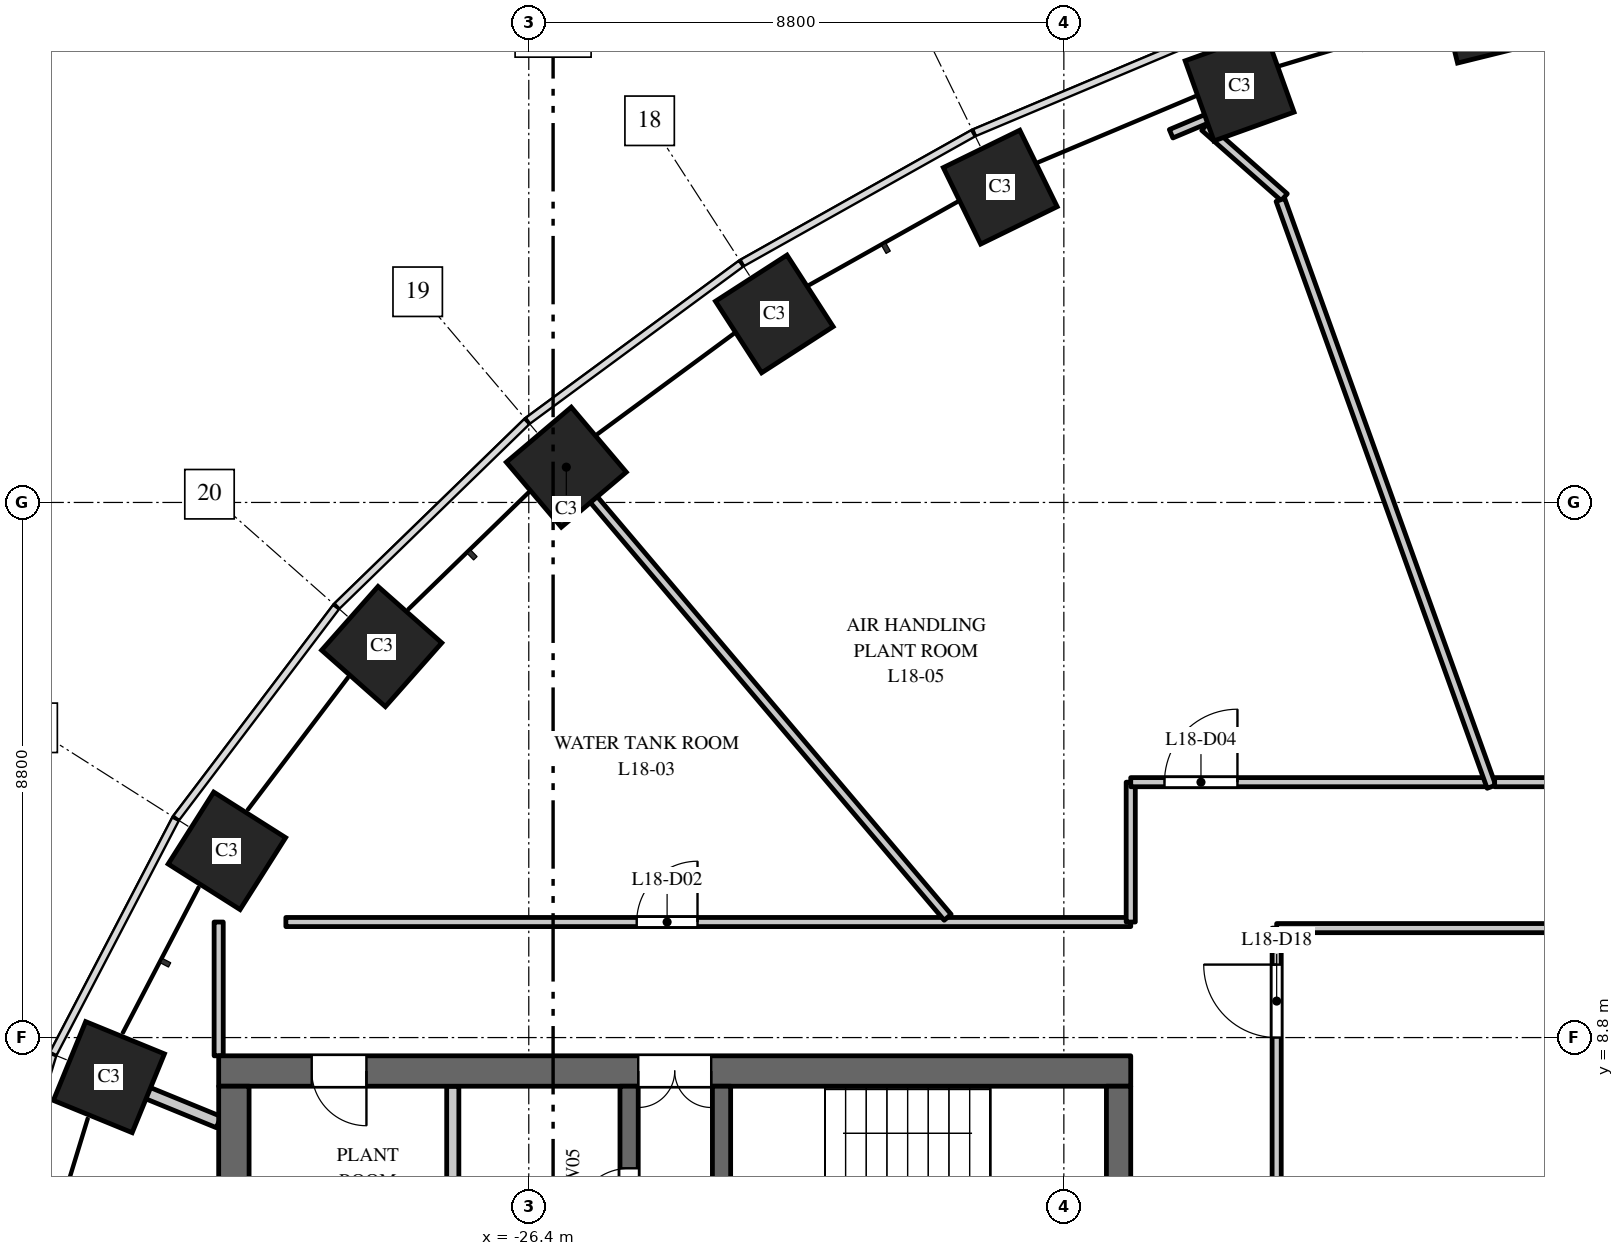
"""IFC4 building model, lengths in metres.
Left out: names, types, materials, properties, quantities, classifications, styles, units other than length and angle.
Written with IfcOpenShell. Run it as: python <this file> out.ifc"""

import sys

from ifc_helpers import new_model, si_unit, direction, frame, frame_2d, origin, origin_2d, place, context, subcontext, project, spatial, rectangle, extrude, element, fill, save


model = new_model("IFC4")
c1 = context("Model", 3, precision=1e-05, world=origin(), true_north=direction((0.0, 1.0)))
c2 = subcontext(c1, "Body", "Model", "MODEL_VIEW")
j1 = project(units=[si_unit("LENGTHUNIT", "METRE"), si_unit("PLANEANGLEUNIT", "RADIAN")], contexts=[c1])
p1 = place(None, origin())
s1 = spatial("IfcSite", under=j1, at=p1, CompositionType="ELEMENT")
p2 = place(p1, origin())
s2 = spatial("IfcBuilding", under=s1, at=p2, CompositionType="ELEMENT")
p3 = place(p2, frame((0.0, 0.0, 82.5)))
s3 = spatial("IfcBuildingStorey", under=s2, at=p3, CompositionType="ELEMENT", Elevation=82.5)
for number, where, z_axis, x_axis in (
    (1, (-10.613, 25.674, 0.0), (0.0, 0.0, 1.0), (-0.971, -0.24, 0.0)),
    (2, (-14.709, 24.441, 0.0), (0.0, 0.0, 1.0), (-0.941, -0.338, 0.0)),
    (3, (-18.646, 22.785, 0.0), (0.0, 0.0, 1.0), (-0.898, -0.439, 0.0)),
    (4, (-22.362, 20.7, 0.0), (0.0, 0.0, 1.0), (-0.84, -0.542, 0.0)),
    (5, (-25.783, 18.18, 0.0), (0.0, 0.0, 1.0), (-0.763, -0.646, 0.0)),
    (6, (-28.819, 15.23, 0.0), (0.0, 0.0, 1.0), (-0.663, -0.749, 0.0)),
    (7, (-31.365, 11.871, 0.0), (0.0, 0.0, 1.0), (-0.535, -0.845, 0.0)),
    (8, (-33.305, 8.149, 0.0), (0.0, 0.0, 1.0), (-0.379, -0.925, 0.0)),
):
    element("IfcColumn", number, at=place(p3, frame(where, z_axis=z_axis, x_axis=x_axis)), inside=s3, PredefinedType="COLUMN", context=c2, shape_type="SweptSolid", body=[
        extrude(rectangle(XDim=1.4, YDim=1.4, at=origin_2d()), origin(), (0.0, 0.0, 1.0), 5.5),
    ])
p4 = place(p3, frame((-16.5, 8.25, 0.0), z_axis=(0.0, 0.0, 1.0), x_axis=(-1.0, 0.0, 0.0)))
e9 = element("IfcWall", 9, at=p4, inside=s3, PredefinedType="SHEAR", context=c2, shape_type="SweptSolid", body=[
    extrude(rectangle(XDim=15.0, YDim=0.5, at=frame_2d((7.5, 0.0))), origin(), (0.0, 0.0, 1.0), 5.2),
])
p5 = place(p4, frame((6.9, 0.0, 0.0)))
e10 = element("IfcOpeningElement", 10, at=p5, cuts=e9, PredefinedType="OPENING", context=c2, shape_type="SweptSolid", body=[
    extrude(rectangle(XDim=1.2, YDim=2.1, at=frame_2d((0.6, 1.05))), frame((0.0, 0.26, 0.0), z_axis=(0.0, -1.0, 0.0), x_axis=(1.0, 0.0, 0.0)), (0.0, 0.0, 1.0), 0.52),
])
p6 = place(p4, frame((12.57, 0.0, 0.0)))
e11 = element("IfcOpeningElement", 11, at=p6, cuts=e9, PredefinedType="OPENING", context=c2, shape_type="SweptSolid", body=[
    extrude(rectangle(XDim=0.9, YDim=2.1, at=frame_2d((0.45, 1.05))), frame((0.0, 0.26, 0.0), z_axis=(0.0, -1.0, 0.0), x_axis=(1.0, 0.0, 0.0)), (0.0, 0.0, 1.0), 0.52),
])
p7 = place(p3, frame((-24.75, -8.0, 0.0), z_axis=(0.0, 0.0, 1.0), x_axis=(0.0, 1.0, 0.0)))
e12 = element("IfcWall", 12, at=p7, inside=s3, PredefinedType="SHEAR", context=c2, shape_type="SweptSolid", body=[
    extrude(rectangle(XDim=16.0, YDim=0.3, at=frame_2d((8.0, 0.0))), origin(), (0.0, 0.0, 1.0), 5.2),
])
p8 = place(p7, frame((4.425, 0.0, 0.0)))
e13 = element("IfcOpeningElement", 13, at=p8, cuts=e12, PredefinedType="OPENING", context=c2, shape_type="SweptSolid", body=[
    extrude(rectangle(XDim=1.1, YDim=2.1, at=frame_2d((0.55, 1.05))), frame((0.0, 0.16, 0.0), z_axis=(0.0, -1.0, 0.0), x_axis=(1.0, 0.0, 0.0)), (0.0, 0.0, 1.0), 0.32),
])
p9 = place(p7, frame((7.45, 0.0, 0.0)))
e14 = element("IfcOpeningElement", 14, at=p9, cuts=e12, PredefinedType="OPENING", context=c2, shape_type="SweptSolid", body=[
    extrude(rectangle(XDim=1.1, YDim=2.1, at=frame_2d((0.55, 1.05))), frame((0.0, 0.16, 0.0), z_axis=(0.0, -1.0, 0.0), x_axis=(1.0, 0.0, 0.0)), (0.0, 0.0, 1.0), 0.32),
])
p10 = place(p7, frame((10.425, 0.0, 0.0)))
e15 = element("IfcOpeningElement", 15, at=p10, cuts=e12, PredefinedType="OPENING", context=c2, shape_type="SweptSolid", body=[
    extrude(rectangle(XDim=1.2, YDim=2.1, at=frame_2d((0.6, 1.05))), frame((0.0, 0.16, 0.0), z_axis=(0.0, -1.0, 0.0), x_axis=(1.0, 0.0, 0.0)), (0.0, 0.0, 1.0), 0.32),
])
p11 = place(p7, frame((13.75, 0.0, 0.0)))
e16 = element("IfcOpeningElement", 16, at=p11, cuts=e12, PredefinedType="OPENING", context=c2, shape_type="SweptSolid", body=[
    extrude(rectangle(XDim=0.9, YDim=2.1, at=frame_2d((0.45, 1.05))), frame((0.0, 0.16, 0.0), z_axis=(0.0, -1.0, 0.0), x_axis=(1.0, 0.0, 0.0)), (0.0, 0.0, 1.0), 0.32),
])
p12 = place(p7, frame((1.975, 0.0, 0.0)))
e17 = element("IfcOpeningElement", 17, at=p12, cuts=e12, PredefinedType="OPENING", context=c2, shape_type="SweptSolid", body=[
    extrude(rectangle(XDim=0.9, YDim=2.1, at=frame_2d((0.45, 1.05))), frame((0.0, 0.16, 0.0), z_axis=(0.0, -1.0, 0.0), x_axis=(1.0, 0.0, 0.0)), (0.0, 0.0, 1.0), 0.32),
])
p13 = place(p7, frame((0.35, 0.0, 0.0)))
e18 = element("IfcOpeningElement", 18, at=p13, cuts=e12, PredefinedType="OPENING", context=c2, shape_type="SweptSolid", body=[
    extrude(rectangle(XDim=0.9, YDim=2.1, at=frame_2d((0.45, 1.05))), frame((0.0, 0.16, 0.0), z_axis=(0.0, -1.0, 0.0), x_axis=(1.0, 0.0, 0.0)), (0.0, 0.0, 1.0), 0.32),
])
p14 = place(p3, frame((-16.7, -8.0, 0.0), z_axis=(0.0, 0.0, 1.0), x_axis=(0.0, 1.0, 0.0)))
e19 = element("IfcWall", 19, at=p14, inside=s3, PredefinedType="SHEAR", context=c2, shape_type="SweptSolid", body=[
    extrude(rectangle(XDim=16.0, YDim=0.4, at=frame_2d((8.0, 0.0))), origin(), (0.0, 0.0, 1.0), 5.2),
])
p15 = place(p3, frame((-31.25, -8.0, 0.0), z_axis=(0.0, 0.0, 1.0), x_axis=(0.0, 1.0, 0.0)))
e20 = element("IfcWall", 20, at=p15, inside=s3, PredefinedType="SHEAR", context=c2, shape_type="SweptSolid", body=[
    extrude(rectangle(XDim=16.0, YDim=0.5, at=frame_2d((8.0, 0.0))), origin(), (0.0, 0.0, 1.0), 5.2),
])
p16 = place(p3, frame((-27.65, 4.75, 0.0), z_axis=(0.0, 0.0, 1.0), x_axis=(0.0, 1.0, 0.0)))
e21 = element("IfcWall", 21, at=p16, inside=s3, PredefinedType="PARTITIONING", context=c2, shape_type="SweptSolid", body=[
    extrude(rectangle(XDim=3.25, YDim=0.2, at=frame_2d((1.625, 0.0))), origin(), (0.0, 0.0, 1.0), 5.2),
])
p17 = place(p3, frame((-23.23, 2.25, 0.0), z_axis=(0.0, 0.0, 1.0), x_axis=(0.0, 1.0, 0.0)))
e22 = element("IfcWall", 22, at=p17, inside=s3, PredefinedType="SHEAR", context=c2, shape_type="SweptSolid", body=[
    extrude(rectangle(XDim=5.75, YDim=0.3, at=frame_2d((2.875, 0.0))), origin(), (0.0, 0.0, 1.0), 5.2),
])
p18 = place(p17, frame((0.6, 0.0, 0.0)))
e23 = element("IfcOpeningElement", 23, at=p18, cuts=e22, PredefinedType="OPENING", context=c2, shape_type="SweptSolid", body=[
    extrude(rectangle(XDim=1.0, YDim=2.1, at=frame_2d((0.5, 1.05))), frame((0.0, 0.16, 0.0), z_axis=(0.0, -1.0, 0.0), x_axis=(1.0, 0.0, 0.0)), (0.0, 0.0, 1.0), 0.32),
])
p19 = place(p3, frame((-33.398, 8.187, 0.0), z_axis=(0.0, 0.0, 1.0), x_axis=(0.925433139688, -0.378910944639, 0.0)))
e24 = element("IfcWall", 24, at=p19, inside=s3, PredefinedType="PARTITIONING", context=c2, shape_type="SweptSolid", body=[
    extrude(rectangle(XDim=2.051, YDim=0.2, at=frame_2d((1.025, 0.0))), origin(), (0.0, 0.0, 1.0), 5.2),
])
p20 = place(p3, frame((-31.5, 8.5, 0.0), z_axis=(0.0, 0.0, 1.0), x_axis=(0.0, 1.0, 0.0)))
e25 = element("IfcWall", 25, at=p20, inside=s3, PredefinedType="PARTITIONING", context=c2, shape_type="SweptSolid", body=[
    extrude(rectangle(XDim=2.2, YDim=0.15, at=frame_2d((1.1, 0.0))), origin(), (0.0, 0.0, 1.0), 5.2),
])
p21 = place(p3, frame((-30.395, 10.7, 0.0), z_axis=(0.0, 0.0, 1.0), x_axis=(1.0, 0.0, 0.0)))
e26 = element("IfcWall", 26, at=p21, inside=s3, PredefinedType="PARTITIONING", context=c2, shape_type="SweptSolid", body=[
    extrude(rectangle(XDim=13.895, YDim=0.15, at=frame_2d((6.948, 0.0))), origin(), (0.0, 0.0, 1.0), 4.4),
])
p22 = place(p21, frame((5.77, 0.0, 0.0)))
e27 = element("IfcOpeningElement", 27, at=p22, cuts=e26, PredefinedType="OPENING", context=c2, shape_type="SweptSolid", body=[
    extrude(rectangle(XDim=1.0, YDim=2.1, at=frame_2d((0.5, 1.05))), frame((0.0, 0.085, 0.0), z_axis=(0.0, -1.0, 0.0), x_axis=(1.0, 0.0, 0.0)), (0.0, 0.0, 1.0), 0.17),
])
p23 = place(p3, frame((-25.847, 18.257, 0.0), z_axis=(0.0, 0.0, 1.0), x_axis=(0.646390974263, -0.76300636196, 0.0)))
e28 = element("IfcWall", 28, at=p23, inside=s3, PredefinedType="PARTITIONING", context=c2, shape_type="SweptSolid", body=[
    extrude(rectangle(XDim=9.802, YDim=0.15, at=frame_2d((4.901, 0.0))), origin(), (0.0, 0.0, 1.0), 5.2),
])
p24 = place(p3, frame((-16.5, 10.7, 0.0), z_axis=(0.0, 0.0, 1.0), x_axis=(0.0, 1.0, 0.0)))
e29 = element("IfcWall", 29, at=p24, inside=s3, PredefinedType="PARTITIONING", context=c2, shape_type="SweptSolid", body=[
    extrude(rectangle(XDim=2.3, YDim=0.15, at=frame_2d((1.15, 0.0))), origin(), (0.0, 0.0, 1.0), 4.25),
])
p25 = place(p3, frame((-16.5, 13.0, 0.0), z_axis=(0.0, 0.0, 1.0), x_axis=(1.0, 0.0, 0.0)))
e30 = element("IfcWall", 30, at=p25, inside=s3, PredefinedType="PARTITIONING", context=c2, shape_type="SweptSolid", body=[
    extrude(rectangle(XDim=5.893, YDim=0.15, at=frame_2d((2.947, 0.0))), origin(), (0.0, 0.0, 1.0), 4.35),
])
p26 = place(p25, frame((0.555, 0.0, 0.0)))
e31 = element("IfcOpeningElement", 31, at=p26, cuts=e30, PredefinedType="OPENING", context=c2, shape_type="SweptSolid", body=[
    extrude(rectangle(XDim=1.2, YDim=2.1, at=frame_2d((0.6, 1.05))), frame((0.0, 0.085, 0.0), z_axis=(0.0, -1.0, 0.0), x_axis=(1.0, 0.0, 0.0)), (0.0, 0.0, 1.0), 0.17),
])
p27 = place(p3, frame((-15.283, 23.776, 0.0), z_axis=(0.0, 0.0, 1.0), x_axis=(0.749266135691, -0.662269022307, 0.0)))
e32 = element("IfcWall", 32, at=p27, inside=s3, PredefinedType="PARTITIONING", context=c2, shape_type="SweptSolid", body=[
    extrude(rectangle(XDim=1.746, YDim=0.15, at=frame_2d((0.873, 0.0))), origin(), (0.0, 0.0, 1.0), 4.4),
])
p28 = place(p3, frame((-14.1, -10.6, 0.0), z_axis=(0.0, 0.0, 1.0), x_axis=(0.0, 1.0, 0.0)))
e33 = element("IfcWall", 33, at=p28, inside=s3, PredefinedType="PARTITIONING", context=c2, shape_type="SweptSolid", body=[
    extrude(rectangle(XDim=21.2, YDim=0.15, at=frame_2d((10.6, 0.0))), origin(), (0.0, 0.0, 1.0), 4.25),
])
p29 = place(p28, frame((19.4, 0.0, 0.0)))
e34 = element("IfcOpeningElement", 34, at=p29, cuts=e33, PredefinedType="OPENING", context=c2, shape_type="SweptSolid", body=[
    extrude(rectangle(XDim=1.2, YDim=2.1, at=frame_2d((0.6, 1.05))), frame((0.0, 0.085, 0.0), z_axis=(0.0, -1.0, 0.0), x_axis=(1.0, 0.0, 0.0)), (0.0, 0.0, 1.0), 0.17),
])
p30 = place(p3, frame((-14.1, 10.6, 0.0), z_axis=(0.0, 0.0, 1.0), x_axis=(1.0, 0.0, 0.0)))
e35 = element("IfcWall", 35, at=p30, inside=s3, PredefinedType="PARTITIONING", context=c2, shape_type="SweptSolid", body=[
    extrude(rectangle(XDim=28.2, YDim=0.15, at=frame_2d((14.1, 0.0))), origin(), (0.0, 0.0, 1.0), 4.35),
])
p31 = place(p30, frame((8.32, 0.0, 0.0)))
e36 = element("IfcOpeningElement", 36, at=p31, cuts=e35, PredefinedType="OPENING", context=c2, shape_type="SweptSolid", body=[
    extrude(rectangle(XDim=1.0, YDim=2.1, at=frame_2d((0.5, 1.05))), frame((0.0, 0.085, 0.0), z_axis=(0.0, -1.0, 0.0), x_axis=(1.0, 0.0, 0.0)), (0.0, 0.0, 1.0), 0.17),
])
p32 = place(p30, frame((13.02, 0.0, 0.0)))
e37 = element("IfcOpeningElement", 37, at=p32, cuts=e35, PredefinedType="OPENING", context=c2, shape_type="SweptSolid", body=[
    extrude(rectangle(XDim=1.0, YDim=2.1, at=frame_2d((0.5, 1.05))), frame((0.0, 0.085, 0.0), z_axis=(0.0, -1.0, 0.0), x_axis=(1.0, 0.0, 0.0)), (0.0, 0.0, 1.0), 0.17),
])
p33 = place(p30, frame((17.72, 0.0, 0.0)))
e38 = element("IfcOpeningElement", 38, at=p33, cuts=e35, PredefinedType="OPENING", context=c2, shape_type="SweptSolid", body=[
    extrude(rectangle(XDim=1.0, YDim=2.1, at=frame_2d((0.5, 1.05))), frame((0.0, 0.085, 0.0), z_axis=(0.0, -1.0, 0.0), x_axis=(1.0, 0.0, 0.0)), (0.0, 0.0, 1.0), 0.17),
])
p34 = place(p30, frame((19.92, 0.0, 0.0)))
e39 = element("IfcOpeningElement", 39, at=p34, cuts=e35, PredefinedType="OPENING", context=c2, shape_type="SweptSolid", body=[
    extrude(rectangle(XDim=1.2, YDim=2.1, at=frame_2d((0.6, 1.05))), frame((0.0, 0.085, 0.0), z_axis=(0.0, -1.0, 0.0), x_axis=(1.0, 0.0, 0.0)), (0.0, 0.0, 1.0), 0.17),
])
p35 = place(p3, frame((-14.039, 22.576, 0.0), z_axis=(0.0, 0.0, 1.0), x_axis=(0.338428639274, -0.940992059541, 0.0)))
e40 = element("IfcWall", 40, at=p35, inside=s3, PredefinedType="PARTITIONING", context=c2, shape_type="SweptSolid", body=[
    extrude(rectangle(XDim=10.256, YDim=0.15, at=frame_2d((5.128, 0.0))), origin(), (0.0, 0.0, 1.0), 4.35),
])
p36 = place(p3, frame((-10.515, 13.0, 0.0), z_axis=(0.0, 0.0, 1.0), x_axis=(1.0, 0.0, 0.0)))
e41 = element("IfcWall", 41, at=p36, inside=s3, PredefinedType="PARTITIONING", context=c2, shape_type="SweptSolid", body=[
    extrude(rectangle(XDim=9.448, YDim=0.15, at=frame_2d((4.724, 0.0))), origin(), (0.0, 0.0, 1.0), 4.35),
])
p37 = place(p36, frame((7.515, 0.0, 0.0)))
e42 = element("IfcOpeningElement", 42, at=p37, cuts=e41, PredefinedType="OPENING", context=c2, shape_type="SweptSolid", body=[
    extrude(rectangle(XDim=1.2, YDim=2.1, at=frame_2d((0.6, 1.05))), frame((0.0, 0.085, 0.0), z_axis=(0.0, -1.0, 0.0), x_axis=(1.0, 0.0, 0.0)), (0.0, 0.0, 1.0), 0.17),
])
p38 = place(p3, frame((-15.229, 23.919, 0.0), z_axis=(0.0, 0.0, 1.0), x_axis=(-0.921921214846, -0.387377430444, 0.0)))
e43 = element("IfcWall", 43, at=p38, inside=s3, PredefinedType="PARTITIONING", context=c2, shape_type="SweptSolid", body=[
    extrude(rectangle(XDim=0.659, YDim=0.15, at=frame_2d((0.329, 0.0))), origin(), (0.0, 0.0, 1.0), 5.2),
])
p39 = place(p5, origin())
e44 = element("IfcDoor", 44, at=p39, inside=s3, OperationType="DOUBLE_DOOR_DOUBLE_SWING", PredefinedType="DOOR", context=c2, shape_type="SweptSolid", body=[
    extrude(rectangle(XDim=1.2, YDim=2.1, at=frame_2d((0.6, 1.05))), frame((0.0, 0.025, 0.0), z_axis=(0.0, -1.0, 0.0), x_axis=(1.0, 0.0, 0.0)), (0.0, 0.0, 1.0), 0.05),
])
fill(e10, e44)
p40 = place(p11, origin())
e45 = element("IfcDoor", 45, at=p40, inside=s3, OperationType="SINGLE_SWING_RIGHT", PredefinedType="DOOR", context=c2, shape_type="SweptSolid", body=[
    extrude(rectangle(XDim=0.9, YDim=2.1, at=frame_2d((0.45, 1.05))), frame((0.0, 0.025, 0.0), z_axis=(0.0, -1.0, 0.0), x_axis=(1.0, 0.0, 0.0)), (0.0, 0.0, 1.0), 0.05),
])
fill(e16, e45)
p41 = place(p6, origin())
e46 = element("IfcDoor", 46, at=p41, inside=s3, OperationType="SINGLE_SWING_RIGHT", PredefinedType="DOOR", context=c2, shape_type="SweptSolid", body=[
    extrude(rectangle(XDim=0.9, YDim=2.1, at=frame_2d((0.45, 1.05))), frame((0.0, 0.025, 0.0), z_axis=(0.0, -1.0, 0.0), x_axis=(1.0, 0.0, 0.0)), (0.0, 0.0, 1.0), 0.05),
])
fill(e11, e46)
p42 = place(p22, origin())
e47 = element("IfcDoor", 47, at=p42, inside=s3, OperationType="SINGLE_SWING_RIGHT", PredefinedType="DOOR", context=c2, shape_type="SweptSolid", body=[
    extrude(rectangle(XDim=1.0, YDim=2.1, at=frame_2d((0.5, 1.05))), frame((0.0, 0.025, 0.0), z_axis=(0.0, -1.0, 0.0), x_axis=(1.0, 0.0, 0.0)), (0.0, 0.0, 1.0), 0.05),
])
fill(e27, e47)
p43 = place(p26, origin())
e48 = element("IfcDoor", 48, at=p43, inside=s3, OperationType="SINGLE_SWING_RIGHT", PredefinedType="DOOR", context=c2, shape_type="SweptSolid", body=[
    extrude(rectangle(XDim=1.2, YDim=2.1, at=frame_2d((0.6, 1.05))), frame((0.0, 0.025, 0.0), z_axis=(0.0, -1.0, 0.0), x_axis=(1.0, 0.0, 0.0)), (0.0, 0.0, 1.0), 0.05),
])
fill(e31, e48)
p44 = place(p29, origin())
e49 = element("IfcDoor", 49, at=p44, inside=s3, OperationType="SINGLE_SWING_RIGHT", PredefinedType="DOOR", context=c2, shape_type="SweptSolid", body=[
    extrude(rectangle(XDim=1.2, YDim=2.1, at=frame_2d((0.6, 1.05))), frame((0.0, 0.025, 0.0), z_axis=(0.0, -1.0, 0.0), x_axis=(1.0, 0.0, 0.0)), (0.0, 0.0, 1.0), 0.05),
])
fill(e34, e49)
save(model, sys.argv[1])
